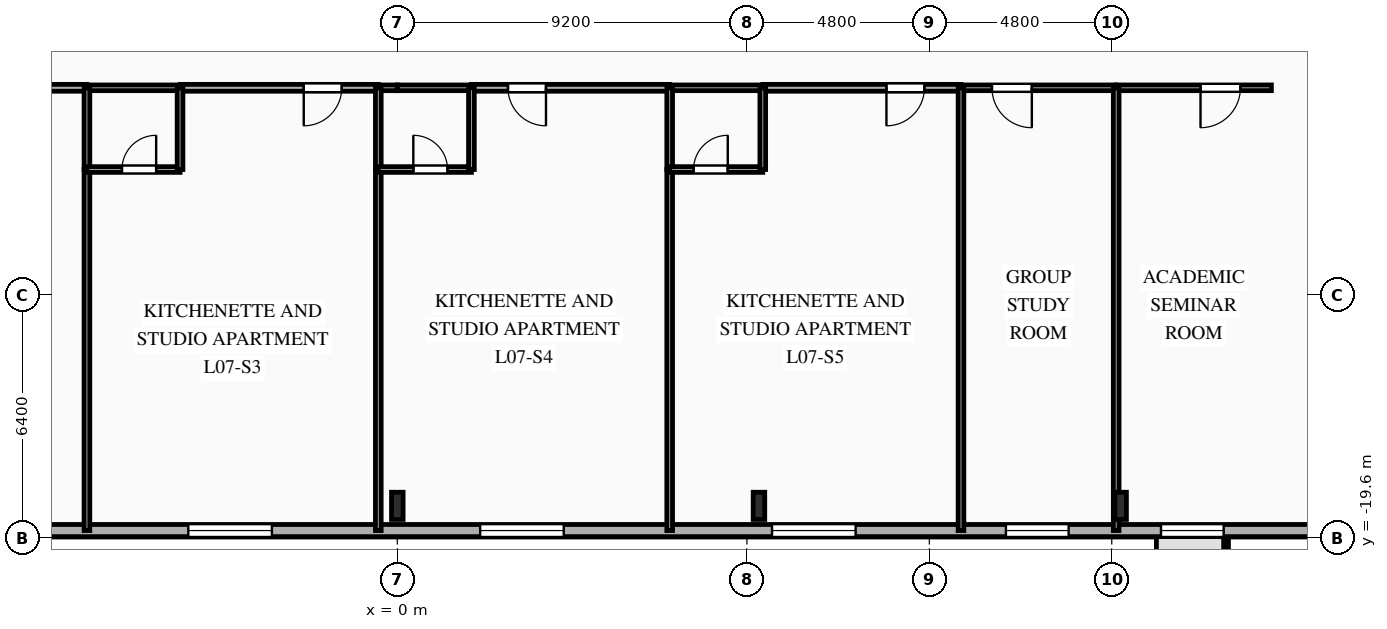
"""IFC4 building model, lengths in metres.
Left out: names, types, materials, properties, quantities, classifications, styles, units other than length and angle.
Written with IfcOpenShell. Run it as: python <this file> out.ifc"""

import sys

from ifc_helpers import new_model, si_unit, direction, frame, frame_2d, origin, origin_2d, place, context, subcontext, project, spatial, rectangle, i_section, extrude, element, fill, save


model = new_model("IFC4")
c1 = context("Model", 3, precision=1e-05, world=origin(), true_north=direction((0.0, 1.0)))
c2 = subcontext(c1, "Body", "Model", "MODEL_VIEW")
j1 = project(units=[si_unit("LENGTHUNIT", "METRE"), si_unit("PLANEANGLEUNIT", "RADIAN")], contexts=[c1])
p1 = place(None, origin())
s1 = spatial("IfcSite", under=j1, at=p1, CompositionType="ELEMENT")
p2 = place(p1, origin())
s2 = spatial("IfcBuilding", under=s1, at=p2, CompositionType="ELEMENT")
p3 = place(p2, frame((0.0, 0.0, 30.35)))
s3 = spatial("IfcBuildingStorey", under=s2, at=p3, CompositionType="ELEMENT", Elevation=30.35)
for number, where, z_axis, x_axis in (
    (1, (0.0, -18.75, 0.0), (0.0, 0.0, 1.0), (1.0, 0.0, 0.0)),
    (2, (9.517, -18.75, 0.0), (0.0, 0.0, 1.0), (1.0, 0.0, 0.0)),
    (3, (19.033, -18.75, 0.0), (0.0, 0.0, 1.0), (1.0, 0.0, 0.0)),
):
    element("IfcColumn", number, at=place(p3, frame(where, z_axis=z_axis, x_axis=x_axis)), inside=s3, PredefinedType="COLUMN", context=c2, shape_type="SweptSolid", body=[
        extrude(i_section(OverallWidth=0.304, OverallDepth=0.716, WebThickness=0.021, FlangeThickness=0.04, FilletRadius=0.027, at=origin_2d()), origin(), (0.0, 0.0, 1.0), 3.35),
    ])
p4 = place(p3, frame((29.2, -19.4, 0.0), z_axis=(0.0, 0.0, 1.0), x_axis=(-1.0, 0.0, 0.0)))
e4 = element("IfcWall", 4, at=p4, inside=s3, PredefinedType="SOLIDWALL", context=c2, shape_type="SweptSolid", body=[
    extrude(rectangle(XDim=58.4, YDim=0.32, at=frame_2d((29.2, 0.0))), origin(), (0.0, 0.0, 1.0), 3.035),
])
p5 = place(p4, frame((7.455, 0.0, 0.85)))
e5 = element("IfcOpeningElement", 5, at=p5, cuts=e4, PredefinedType="OPENING", context=c2, shape_type="SweptSolid", body=[
    extrude(rectangle(XDim=1.65, YDim=1.85, at=frame_2d((0.825, 0.925))), frame((0.0, 0.17, 0.0), z_axis=(0.0, -1.0, 0.0), x_axis=(1.0, 0.0, 0.0)), (0.0, 0.0, 1.0), 0.34),
])
p6 = place(p4, frame((11.535, 0.0, 0.85)))
e6 = element("IfcOpeningElement", 6, at=p6, cuts=e4, PredefinedType="OPENING", context=c2, shape_type="SweptSolid", body=[
    extrude(rectangle(XDim=1.65, YDim=1.85, at=frame_2d((0.825, 0.925))), frame((0.0, 0.17, 0.0), z_axis=(0.0, -1.0, 0.0), x_axis=(1.0, 0.0, 0.0)), (0.0, 0.0, 1.0), 0.34),
])
p7 = place(p4, frame((17.14, 0.0, 0.85)))
e7 = element("IfcOpeningElement", 7, at=p7, cuts=e4, PredefinedType="OPENING", context=c2, shape_type="SweptSolid", body=[
    extrude(rectangle(XDim=2.2, YDim=1.85, at=frame_2d((1.1, 0.925))), frame((0.0, 0.17, 0.0), z_axis=(0.0, -1.0, 0.0), x_axis=(1.0, 0.0, 0.0)), (0.0, 0.0, 1.0), 0.34),
])
p8 = place(p4, frame((24.82, 0.0, 0.85)))
e8 = element("IfcOpeningElement", 8, at=p8, cuts=e4, PredefinedType="OPENING", context=c2, shape_type="SweptSolid", body=[
    extrude(rectangle(XDim=2.2, YDim=1.85, at=frame_2d((1.1, 0.925))), frame((0.0, 0.17, 0.0), z_axis=(0.0, -1.0, 0.0), x_axis=(1.0, 0.0, 0.0)), (0.0, 0.0, 1.0), 0.34),
])
p9 = place(p4, frame((32.5, 0.0, 0.85)))
e9 = element("IfcOpeningElement", 9, at=p9, cuts=e4, PredefinedType="OPENING", context=c2, shape_type="SweptSolid", body=[
    extrude(rectangle(XDim=2.2, YDim=1.85, at=frame_2d((1.1, 0.925))), frame((0.0, 0.17, 0.0), z_axis=(0.0, -1.0, 0.0), x_axis=(1.0, 0.0, 0.0)), (0.0, 0.0, 1.0), 0.34),
])
p10 = place(p4, frame((40.14, 0.0, 0.85)))
e10 = element("IfcOpeningElement", 10, at=p10, cuts=e4, PredefinedType="OPENING", context=c2, shape_type="SweptSolid", body=[
    extrude(rectangle(XDim=2.2, YDim=1.85, at=frame_2d((1.1, 0.925))), frame((0.0, 0.17, 0.0), z_axis=(0.0, -1.0, 0.0), x_axis=(1.0, 0.0, 0.0)), (0.0, 0.0, 1.0), 0.34),
])
p11 = place(p4, frame((46.015, 0.0, 0.85)))
e11 = element("IfcOpeningElement", 11, at=p11, cuts=e4, PredefinedType="OPENING", context=c2, shape_type="SweptSolid", body=[
    extrude(rectangle(XDim=1.65, YDim=1.85, at=frame_2d((0.825, 0.925))), frame((0.0, 0.17, 0.0), z_axis=(0.0, -1.0, 0.0), x_axis=(1.0, 0.0, 0.0)), (0.0, 0.0, 1.0), 0.34),
])
p12 = place(p4, frame((49.615, 0.0, 0.85)))
e12 = element("IfcOpeningElement", 12, at=p12, cuts=e4, PredefinedType="OPENING", context=c2, shape_type="SweptSolid", body=[
    extrude(rectangle(XDim=1.65, YDim=1.85, at=frame_2d((0.825, 0.925))), frame((0.0, 0.17, 0.0), z_axis=(0.0, -1.0, 0.0), x_axis=(1.0, 0.0, 0.0)), (0.0, 0.0, 1.0), 0.34),
])
p13 = place(p3, frame((-8.167, -7.75, 0.0), z_axis=(0.0, 0.0, 1.0), x_axis=(-1.0, 0.0, 0.0)))
e13 = element("IfcWall", 13, at=p13, inside=s3, PredefinedType="PARTITIONING", context=c2, shape_type="SweptSolid", body=[
    extrude(rectangle(XDim=5.216, YDim=0.18, at=frame_2d((2.608, 0.0))), origin(), (0.0, 0.0, 1.0), 3.035),
])
p14 = place(p13, frame((3.254, 0.0, 0.0)))
e14 = element("IfcOpeningElement", 14, at=p14, cuts=e13, PredefinedType="OPENING", context=c2, shape_type="SweptSolid", body=[
    extrude(rectangle(XDim=1.0, YDim=2.15, at=frame_2d((0.5, 1.075))), frame((0.0, 0.1, 0.0), z_axis=(0.0, -1.0, 0.0), x_axis=(1.0, 0.0, 0.0)), (0.0, 0.0, 1.0), 0.2),
])
p15 = place(p3, frame((-0.5, -7.75, 0.0), z_axis=(0.0, 0.0, 1.0), x_axis=(-1.0, 0.0, 0.0)))
e15 = element("IfcWall", 15, at=p15, inside=s3, PredefinedType="PARTITIONING", context=c2, shape_type="SweptSolid", body=[
    extrude(rectangle(XDim=5.217, YDim=0.18, at=frame_2d((2.608, 0.0))), origin(), (0.0, 0.0, 1.0), 3.035),
])
p16 = place(p15, frame((0.962, 0.0, 0.0)))
e16 = element("IfcOpeningElement", 16, at=p16, cuts=e15, PredefinedType="OPENING", context=c2, shape_type="SweptSolid", body=[
    extrude(rectangle(XDim=1.0, YDim=2.15, at=frame_2d((0.5, 1.075))), frame((0.0, 0.1, 0.0), z_axis=(0.0, -1.0, 0.0), x_axis=(1.0, 0.0, 0.0)), (0.0, 0.0, 1.0), 0.2),
])
p17 = place(p3, frame((-5.717, -7.75, 0.0), z_axis=(0.0, 0.0, 1.0), x_axis=(-1.0, 0.0, 0.0)))
e17 = element("IfcWall", 17, at=p17, inside=s3, PredefinedType="PLUMBINGWALL", context=c2, shape_type="SweptSolid", body=[
    extrude(rectangle(XDim=2.45, YDim=0.15, at=frame_2d((1.225, 0.0))), origin(), (0.0, 0.0, 1.0), 3.035),
])
p18 = place(p3, frame((0.0, -7.75, 0.0), z_axis=(0.0, 0.0, 1.0), x_axis=(-1.0, 0.0, 0.0)))
e18 = element("IfcWall", 18, at=p18, inside=s3, PredefinedType="PLUMBINGWALL", context=c2, shape_type="SweptSolid", body=[
    extrude(rectangle(XDim=0.5, YDim=0.15, at=frame_2d((0.25, 0.0))), origin(), (0.0, 0.0, 1.0), 3.035),
])
p19 = place(p3, frame((7.167, -7.75, 0.0), z_axis=(0.0, 0.0, 1.0), x_axis=(-1.0, 0.0, 0.0)))
e19 = element("IfcWall", 19, at=p19, inside=s3, PredefinedType="PARTITIONING", context=c2, shape_type="SweptSolid", body=[
    extrude(rectangle(XDim=5.217, YDim=0.18, at=frame_2d((2.608, 0.0))), origin(), (0.0, 0.0, 1.0), 3.035),
])
p20 = place(p19, frame((3.255, 0.0, 0.0)))
e20 = element("IfcOpeningElement", 20, at=p20, cuts=e19, PredefinedType="OPENING", context=c2, shape_type="SweptSolid", body=[
    extrude(rectangle(XDim=1.0, YDim=2.15, at=frame_2d((0.5, 1.075))), frame((0.0, 0.1, 0.0), z_axis=(0.0, -1.0, 0.0), x_axis=(1.0, 0.0, 0.0)), (0.0, 0.0, 1.0), 0.2),
])
p21 = place(p3, frame((1.95, -7.75, 0.0), z_axis=(0.0, 0.0, 1.0), x_axis=(-1.0, 0.0, 0.0)))
e21 = element("IfcWall", 21, at=p21, inside=s3, PredefinedType="PLUMBINGWALL", context=c2, shape_type="SweptSolid", body=[
    extrude(rectangle(XDim=1.95, YDim=0.15, at=frame_2d((0.975, 0.0))), origin(), (0.0, 0.0, 1.0), 3.035),
])
p22 = place(p3, frame((14.833, -7.75, 0.0), z_axis=(0.0, 0.0, 1.0), x_axis=(-1.0, 0.0, 0.0)))
e22 = element("IfcWall", 22, at=p22, inside=s3, PredefinedType="PARTITIONING", context=c2, shape_type="SweptSolid", body=[
    extrude(rectangle(XDim=5.216, YDim=0.18, at=frame_2d((2.608, 0.0))), origin(), (0.0, 0.0, 1.0), 3.035),
])
p23 = place(p22, frame((0.962, 0.0, 0.0)))
e23 = element("IfcOpeningElement", 23, at=p23, cuts=e22, PredefinedType="OPENING", context=c2, shape_type="SweptSolid", body=[
    extrude(rectangle(XDim=1.0, YDim=2.15, at=frame_2d((0.5, 1.075))), frame((0.0, 0.1, 0.0), z_axis=(0.0, -1.0, 0.0), x_axis=(1.0, 0.0, 0.0)), (0.0, 0.0, 1.0), 0.2),
])
p24 = place(p3, frame((9.617, -7.75, 0.0), z_axis=(0.0, 0.0, 1.0), x_axis=(-1.0, 0.0, 0.0)))
e24 = element("IfcWall", 24, at=p24, inside=s3, PredefinedType="PLUMBINGWALL", context=c2, shape_type="SweptSolid", body=[
    extrude(rectangle(XDim=2.45, YDim=0.15, at=frame_2d((1.225, 0.0))), origin(), (0.0, 0.0, 1.0), 3.035),
])
p25 = place(p3, frame((18.917, -7.75, 0.0), z_axis=(0.0, 0.0, 1.0), x_axis=(-1.0, 0.0, 0.0)))
e25 = element("IfcWall", 25, at=p25, inside=s3, PredefinedType="PARTITIONING", context=c2, shape_type="SweptSolid", body=[
    extrude(rectangle(XDim=4.083, YDim=0.15, at=frame_2d((2.042, 0.0))), origin(), (0.0, 0.0, 1.0), 3.035),
])
p26 = place(p25, frame((2.219, 0.0, 0.0)))
e26 = element("IfcOpeningElement", 26, at=p26, cuts=e25, PredefinedType="OPENING", context=c2, shape_type="SweptSolid", body=[
    extrude(rectangle(XDim=1.05, YDim=2.15, at=frame_2d((0.525, 1.075))), frame((0.0, 0.085, 0.0), z_axis=(0.0, -1.0, 0.0), x_axis=(1.0, 0.0, 0.0)), (0.0, 0.0, 1.0), 0.17),
])
p27 = place(p3, frame((23.0, -7.75, 0.0), z_axis=(0.0, 0.0, 1.0), x_axis=(-1.0, 0.0, 0.0)))
e27 = element("IfcWall", 27, at=p27, inside=s3, PredefinedType="PARTITIONING", context=c2, shape_type="SweptSolid", body=[
    extrude(rectangle(XDim=4.083, YDim=0.15, at=frame_2d((2.042, 0.0))), origin(), (0.0, 0.0, 1.0), 3.035),
])
p28 = place(p27, frame((0.814, 0.0, 0.0)))
e28 = element("IfcOpeningElement", 28, at=p28, cuts=e27, PredefinedType="OPENING", context=c2, shape_type="SweptSolid", body=[
    extrude(rectangle(XDim=1.05, YDim=2.15, at=frame_2d((0.525, 1.075))), frame((0.0, 0.085, 0.0), z_axis=(0.0, -1.0, 0.0), x_axis=(1.0, 0.0, 0.0)), (0.0, 0.0, 1.0), 0.17),
])
p29 = place(p3, frame((-8.167, -9.9, 0.0), z_axis=(0.0, 0.0, 1.0), x_axis=(0.0, -1.0, 0.0)))
e29 = element("IfcWall", 29, at=p29, inside=s3, PredefinedType="PARTITIONING", context=c2, shape_type="SweptSolid", body=[
    extrude(rectangle(XDim=9.5, YDim=0.15, at=frame_2d((4.75, 0.0))), origin(), (0.0, 0.0, 1.0), 3.035),
])
p30 = place(p3, frame((-8.167, -7.75, 0.0), z_axis=(0.0, 0.0, 1.0), x_axis=(0.0, -1.0, 0.0)))
e30 = element("IfcWall", 30, at=p30, inside=s3, PredefinedType="PLUMBINGWALL", context=c2, shape_type="SweptSolid", body=[
    extrude(rectangle(XDim=2.15, YDim=0.15, at=frame_2d((1.075, 0.0))), origin(), (0.0, 0.0, 1.0), 3.035),
])
p31 = place(p3, frame((-8.167, -9.9, 0.0), z_axis=(0.0, 0.0, 1.0), x_axis=(1.0, 0.0, 0.0)))
e31 = element("IfcWall", 31, at=p31, inside=s3, PredefinedType="PLUMBINGWALL", context=c2, shape_type="SweptSolid", body=[
    extrude(rectangle(XDim=2.45, YDim=0.15, at=frame_2d((1.225, 0.0))), origin(), (0.0, 0.0, 1.0), 3.035),
])
p32 = place(p31, frame((0.921, 0.0, 0.0)))
e32 = element("IfcOpeningElement", 32, at=p32, cuts=e31, PredefinedType="OPENING", context=c2, shape_type="SweptSolid", body=[
    extrude(rectangle(XDim=0.9, YDim=2.1, at=frame_2d((0.45, 1.05))), frame((0.0, 0.085, 0.0), z_axis=(0.0, -1.0, 0.0), x_axis=(1.0, 0.0, 0.0)), (0.0, 0.0, 1.0), 0.17),
])
p33 = place(p3, frame((-5.717, -9.9, 0.0), z_axis=(0.0, 0.0, 1.0), x_axis=(0.0, 1.0, 0.0)))
e33 = element("IfcWall", 33, at=p33, inside=s3, PredefinedType="PLUMBINGWALL", context=c2, shape_type="SweptSolid", body=[
    extrude(rectangle(XDim=2.15, YDim=0.15, at=frame_2d((1.075, 0.0))), origin(), (0.0, 0.0, 1.0), 3.035),
])
p34 = place(p3, frame((-0.5, -9.9, 0.0), z_axis=(0.0, 0.0, 1.0), x_axis=(0.0, -1.0, 0.0)))
e34 = element("IfcWall", 34, at=p34, inside=s3, PredefinedType="PARTITIONING", context=c2, shape_type="SweptSolid", body=[
    extrude(rectangle(XDim=9.5, YDim=0.15, at=frame_2d((4.75, 0.0))), origin(), (0.0, 0.0, 1.0), 3.035),
])
p35 = place(p3, frame((-0.5, -7.75, 0.0), z_axis=(0.0, 0.0, 1.0), x_axis=(0.0, -1.0, 0.0)))
e35 = element("IfcWall", 35, at=p35, inside=s3, PredefinedType="PLUMBINGWALL", context=c2, shape_type="SweptSolid", body=[
    extrude(rectangle(XDim=2.15, YDim=0.15, at=frame_2d((1.075, 0.0))), origin(), (0.0, 0.0, 1.0), 3.035),
])
p36 = place(p3, frame((-0.5, -9.9, 0.0), z_axis=(0.0, 0.0, 1.0), x_axis=(1.0, 0.0, 0.0)))
e36 = element("IfcWall", 36, at=p36, inside=s3, PredefinedType="PLUMBINGWALL", context=c2, shape_type="SweptSolid", body=[
    extrude(rectangle(XDim=2.45, YDim=0.15, at=frame_2d((1.225, 0.0))), origin(), (0.0, 0.0, 1.0), 3.035),
])
p37 = place(p36, frame((0.921, 0.0, 0.0)))
e37 = element("IfcOpeningElement", 37, at=p37, cuts=e36, PredefinedType="OPENING", context=c2, shape_type="SweptSolid", body=[
    extrude(rectangle(XDim=0.9, YDim=2.1, at=frame_2d((0.45, 1.05))), frame((0.0, 0.085, 0.0), z_axis=(0.0, -1.0, 0.0), x_axis=(1.0, 0.0, 0.0)), (0.0, 0.0, 1.0), 0.17),
])
p38 = place(p3, frame((1.95, -9.9, 0.0), z_axis=(0.0, 0.0, 1.0), x_axis=(0.0, 1.0, 0.0)))
e38 = element("IfcWall", 38, at=p38, inside=s3, PredefinedType="PLUMBINGWALL", context=c2, shape_type="SweptSolid", body=[
    extrude(rectangle(XDim=2.15, YDim=0.15, at=frame_2d((1.075, 0.0))), origin(), (0.0, 0.0, 1.0), 3.035),
])
p39 = place(p3, frame((7.167, -9.9, 0.0), z_axis=(0.0, 0.0, 1.0), x_axis=(0.0, -1.0, 0.0)))
e39 = element("IfcWall", 39, at=p39, inside=s3, PredefinedType="PARTITIONING", context=c2, shape_type="SweptSolid", body=[
    extrude(rectangle(XDim=9.5, YDim=0.15, at=frame_2d((4.75, 0.0))), origin(), (0.0, 0.0, 1.0), 3.035),
])
p40 = place(p3, frame((7.167, -7.75, 0.0), z_axis=(0.0, 0.0, 1.0), x_axis=(0.0, -1.0, 0.0)))
e40 = element("IfcWall", 40, at=p40, inside=s3, PredefinedType="PLUMBINGWALL", context=c2, shape_type="SweptSolid", body=[
    extrude(rectangle(XDim=2.15, YDim=0.15, at=frame_2d((1.075, 0.0))), origin(), (0.0, 0.0, 1.0), 3.035),
])
p41 = place(p3, frame((7.167, -9.9, 0.0), z_axis=(0.0, 0.0, 1.0), x_axis=(1.0, 0.0, 0.0)))
e41 = element("IfcWall", 41, at=p41, inside=s3, PredefinedType="PLUMBINGWALL", context=c2, shape_type="SweptSolid", body=[
    extrude(rectangle(XDim=2.45, YDim=0.15, at=frame_2d((1.225, 0.0))), origin(), (0.0, 0.0, 1.0), 3.035),
])
p42 = place(p41, frame((0.629, 0.0, 0.0)))
e42 = element("IfcOpeningElement", 42, at=p42, cuts=e41, PredefinedType="OPENING", context=c2, shape_type="SweptSolid", body=[
    extrude(rectangle(XDim=0.9, YDim=2.1, at=frame_2d((0.45, 1.05))), frame((0.0, 0.085, 0.0), z_axis=(0.0, -1.0, 0.0), x_axis=(1.0, 0.0, 0.0)), (0.0, 0.0, 1.0), 0.17),
])
p43 = place(p3, frame((9.617, -9.9, 0.0), z_axis=(0.0, 0.0, 1.0), x_axis=(0.0, 1.0, 0.0)))
e43 = element("IfcWall", 43, at=p43, inside=s3, PredefinedType="PLUMBINGWALL", context=c2, shape_type="SweptSolid", body=[
    extrude(rectangle(XDim=2.15, YDim=0.15, at=frame_2d((1.075, 0.0))), origin(), (0.0, 0.0, 1.0), 3.035),
])
p44 = place(p3, frame((14.833, -7.75, 0.0), z_axis=(0.0, 0.0, 1.0), x_axis=(0.0, -1.0, 0.0)))
e44 = element("IfcWall", 44, at=p44, inside=s3, PredefinedType="PARTITIONING", context=c2, shape_type="SweptSolid", body=[
    extrude(rectangle(XDim=11.65, YDim=0.15, at=frame_2d((5.825, 0.0))), origin(), (0.0, 0.0, 1.0), 3.035),
])
p45 = place(p3, frame((18.917, -7.75, 0.0), z_axis=(0.0, 0.0, 1.0), x_axis=(0.0, -1.0, 0.0)))
e45 = element("IfcWall", 45, at=p45, inside=s3, PredefinedType="PARTITIONING", context=c2, shape_type="SweptSolid", body=[
    extrude(rectangle(XDim=11.65, YDim=0.15, at=frame_2d((5.825, 0.0))), origin(), (0.0, 0.0, 1.0), 2.52),
])
p46 = place(p5, origin())
e46 = element("IfcWindow", 46, at=p46, inside=s3, PartitioningType="SINGLE_PANEL", PredefinedType="WINDOW", context=c2, shape_type="SweptSolid", body=[
    extrude(rectangle(XDim=1.65, YDim=1.85, at=frame_2d((0.825, 0.925))), frame((0.0, 0.03, 0.0), z_axis=(0.0, -1.0, 0.0), x_axis=(1.0, 0.0, 0.0)), (0.0, 0.0, 1.0), 0.06),
])
fill(e5, e46)
p47 = place(p6, origin())
e47 = element("IfcWindow", 47, at=p47, inside=s3, PartitioningType="SINGLE_PANEL", PredefinedType="WINDOW", context=c2, shape_type="SweptSolid", body=[
    extrude(rectangle(XDim=1.65, YDim=1.85, at=frame_2d((0.825, 0.925))), frame((0.0, 0.03, 0.0), z_axis=(0.0, -1.0, 0.0), x_axis=(1.0, 0.0, 0.0)), (0.0, 0.0, 1.0), 0.06),
])
fill(e6, e47)
p48 = place(p7, origin())
e48 = element("IfcWindow", 48, at=p48, inside=s3, PartitioningType="SINGLE_PANEL", PredefinedType="WINDOW", context=c2, shape_type="SweptSolid", body=[
    extrude(rectangle(XDim=2.2, YDim=1.85, at=frame_2d((1.1, 0.925))), frame((0.0, 0.03, 0.0), z_axis=(0.0, -1.0, 0.0), x_axis=(1.0, 0.0, 0.0)), (0.0, 0.0, 1.0), 0.06),
])
fill(e7, e48)
p49 = place(p8, origin())
e49 = element("IfcWindow", 49, at=p49, inside=s3, PartitioningType="SINGLE_PANEL", PredefinedType="WINDOW", context=c2, shape_type="SweptSolid", body=[
    extrude(rectangle(XDim=2.2, YDim=1.85, at=frame_2d((1.1, 0.925))), frame((0.0, 0.03, 0.0), z_axis=(0.0, -1.0, 0.0), x_axis=(1.0, 0.0, 0.0)), (0.0, 0.0, 1.0), 0.06),
])
fill(e8, e49)
p50 = place(p9, origin())
e50 = element("IfcWindow", 50, at=p50, inside=s3, PartitioningType="SINGLE_PANEL", PredefinedType="WINDOW", context=c2, shape_type="SweptSolid", body=[
    extrude(rectangle(XDim=2.2, YDim=1.85, at=frame_2d((1.1, 0.925))), frame((0.0, 0.03, 0.0), z_axis=(0.0, -1.0, 0.0), x_axis=(1.0, 0.0, 0.0)), (0.0, 0.0, 1.0), 0.06),
])
fill(e9, e50)
p51 = place(p16, origin())
e51 = element("IfcDoor", 51, at=p51, inside=s3, OperationType="SINGLE_SWING_RIGHT", PredefinedType="DOOR", context=c2, shape_type="SweptSolid", body=[
    extrude(rectangle(XDim=1.0, YDim=2.15, at=frame_2d((0.5, 1.075))), frame((0.0, 0.025, 0.0), z_axis=(0.0, -1.0, 0.0), x_axis=(1.0, 0.0, 0.0)), (0.0, 0.0, 1.0), 0.05),
])
fill(e16, e51)
p52 = place(p20, origin())
e52 = element("IfcDoor", 52, at=p52, inside=s3, OperationType="SINGLE_SWING_LEFT", PredefinedType="DOOR", context=c2, shape_type="SweptSolid", body=[
    extrude(rectangle(XDim=1.0, YDim=2.15, at=frame_2d((0.5, 1.075))), frame((0.0, 0.025, 0.0), z_axis=(0.0, -1.0, 0.0), x_axis=(1.0, 0.0, 0.0)), (0.0, 0.0, 1.0), 0.05),
])
fill(e20, e52)
p53 = place(p23, origin())
e53 = element("IfcDoor", 53, at=p53, inside=s3, OperationType="SINGLE_SWING_RIGHT", PredefinedType="DOOR", context=c2, shape_type="SweptSolid", body=[
    extrude(rectangle(XDim=1.0, YDim=2.15, at=frame_2d((0.5, 1.075))), frame((0.0, 0.025, 0.0), z_axis=(0.0, -1.0, 0.0), x_axis=(1.0, 0.0, 0.0)), (0.0, 0.0, 1.0), 0.05),
])
fill(e23, e53)
p54 = place(p26, origin())
e54 = element("IfcDoor", 54, at=p54, inside=s3, OperationType="SINGLE_SWING_LEFT", PredefinedType="DOOR", context=c2, shape_type="SweptSolid", body=[
    extrude(rectangle(XDim=1.05, YDim=2.15, at=frame_2d((0.525, 1.075))), frame((0.0, 0.025, 0.0), z_axis=(0.0, -1.0, 0.0), x_axis=(1.0, 0.0, 0.0)), (0.0, 0.0, 1.0), 0.05),
])
fill(e26, e54)
p55 = place(p28, origin())
e55 = element("IfcDoor", 55, at=p55, inside=s3, OperationType="SINGLE_SWING_RIGHT", PredefinedType="DOOR", context=c2, shape_type="SweptSolid", body=[
    extrude(rectangle(XDim=1.05, YDim=2.15, at=frame_2d((0.525, 1.075))), frame((0.0, 0.025, 0.0), z_axis=(0.0, -1.0, 0.0), x_axis=(1.0, 0.0, 0.0)), (0.0, 0.0, 1.0), 0.05),
])
fill(e28, e55)
p56 = place(p32, origin())
e56 = element("IfcDoor", 56, at=p56, inside=s3, OperationType="SINGLE_SWING_RIGHT", PredefinedType="DOOR", context=c2, shape_type="SweptSolid", body=[
    extrude(rectangle(XDim=0.9, YDim=2.1, at=frame_2d((0.45, 1.05))), frame((0.0, 0.025, 0.0), z_axis=(0.0, -1.0, 0.0), x_axis=(1.0, 0.0, 0.0)), (0.0, 0.0, 1.0), 0.05),
])
fill(e32, e56)
p57 = place(p37, origin())
e57 = element("IfcDoor", 57, at=p57, inside=s3, OperationType="SINGLE_SWING_LEFT", PredefinedType="DOOR", context=c2, shape_type="SweptSolid", body=[
    extrude(rectangle(XDim=0.9, YDim=2.1, at=frame_2d((0.45, 1.05))), frame((0.0, 0.025, 0.0), z_axis=(0.0, -1.0, 0.0), x_axis=(1.0, 0.0, 0.0)), (0.0, 0.0, 1.0), 0.05),
])
fill(e37, e57)
p58 = place(p42, origin())
e58 = element("IfcDoor", 58, at=p58, inside=s3, OperationType="SINGLE_SWING_RIGHT", PredefinedType="DOOR", context=c2, shape_type="SweptSolid", body=[
    extrude(rectangle(XDim=0.9, YDim=2.1, at=frame_2d((0.45, 1.05))), frame((0.0, 0.025, 0.0), z_axis=(0.0, -1.0, 0.0), x_axis=(1.0, 0.0, 0.0)), (0.0, 0.0, 1.0), 0.05),
])
fill(e42, e58)
save(model, sys.argv[1])
